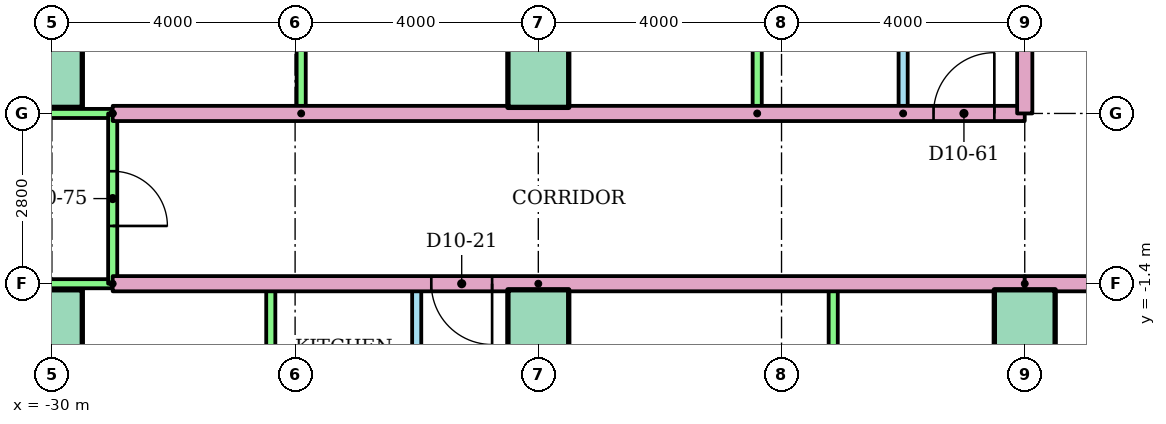
"""IFC4 building model, lengths in metres.
Left out: names, types, materials, properties, quantities, classifications, styles, units other than length and angle.
Written with IfcOpenShell. Run it as: python <this file> out.ifc"""

import sys

from ifc_helpers import new_model, si_unit, direction, frame, frame_2d, origin, origin_2d, place, context, subcontext, project, spatial, rectangle, extrude, element, fill, save


model = new_model("IFC4")
c1 = context("Model", 3, precision=1e-05, world=origin(), true_north=direction((0.0, 1.0)))
c2 = subcontext(c1, "Body", "Model", "MODEL_VIEW")
j1 = project(units=[si_unit("LENGTHUNIT", "METRE"), si_unit("PLANEANGLEUNIT", "RADIAN")], contexts=[c1])
p1 = place(None, origin())
s1 = spatial("IfcSite", under=j1, at=p1, CompositionType="ELEMENT")
p2 = place(p1, origin())
s2 = spatial("IfcBuilding", under=s1, at=p2, CompositionType="ELEMENT")
p3 = place(p2, frame((0.0, 0.0, 41.6)))
s3 = spatial("IfcBuildingStorey", under=s2, at=p3, CompositionType="ELEMENT", Elevation=41.6)
for number, where in (
    (1, (-30.0, -2.0, 0.0)),
    (2, (-22.0, -2.0, 0.0)),
    (3, (-14.0, -2.0, 0.0)),
    (4, (-30.0, 2.0, 0.0)),
    (5, (-22.0, 2.0, 0.0)),
):
    element("IfcColumn", number, at=place(p3, frame(where)), inside=s3, PredefinedType="COLUMN", context=c2, shape_type="SweptSolid", body=[
        extrude(rectangle(XDim=1.0, YDim=1.0, at=origin_2d()), origin(), (0.0, 0.0, 1.0), 3.2),
    ])
p4 = place(p3, frame((-24.0, -7.8, 0.0), z_axis=(0.0, 0.0, 1.0), x_axis=(0.0, 1.0, 0.0)))
e6 = element("IfcWall", 6, at=p4, inside=s3, PredefinedType="PARTITIONING", context=c2, shape_type="SweptSolid", body=[
    extrude(rectangle(XDim=6.4, YDim=0.15, at=frame_2d((3.2, 0.0))), origin(), (0.0, 0.0, 1.0), 2.4),
])
p5 = place(p4, frame((4.14, 0.0, 0.0)))
e7 = element("IfcOpeningElement", 7, at=p5, cuts=e6, PredefinedType="OPENING", context=c2, shape_type="SweptSolid", body=[
    extrude(rectangle(XDim=0.9, YDim=2.1, at=frame_2d((0.45, 1.05))), frame((0.0, 0.085, 0.0), z_axis=(0.0, -1.0, 0.0), x_axis=(1.0, 0.0, 0.0)), (0.0, 0.0, 1.0), 0.17),
])
p6 = place(p4, frame((1.05, 0.0, 0.0)))
e8 = element("IfcOpeningElement", 8, at=p6, cuts=e6, PredefinedType="OPENING", context=c2, shape_type="SweptSolid", body=[
    extrude(rectangle(XDim=0.8, YDim=2.1, at=frame_2d((0.4, 1.05))), frame((0.0, 0.085, 0.0), z_axis=(0.0, -1.0, 0.0), x_axis=(1.0, 0.0, 0.0)), (0.0, 0.0, 1.0), 0.17),
])
for number, where, z_axis, x_axis in (
    (9, (-26.4, -7.8, 0.0), (0.0, 0.0, 1.0), (0.0, 1.0, 0.0)),
    (10, (-17.15, -7.8, 0.0), (0.0, 0.0, 1.0), (0.0, 1.0, 0.0)),
):
    element("IfcWall", number, at=place(p3, frame(where, z_axis=z_axis, x_axis=x_axis)), inside=s3, PredefinedType="PARTITIONING", context=c2, shape_type="SweptSolid", body=[
        extrude(rectangle(XDim=6.4, YDim=0.15, at=frame_2d((3.2, 0.0))), origin(), (0.0, 0.0, 1.0), 2.4),
    ])
p7 = place(p3, frame((-22.0, -1.4, 0.0), z_axis=(0.0, 0.0, 1.0), x_axis=(0.0, -1.0, 0.0)))
e11 = element("IfcWall", 11, at=p7, inside=s3, PredefinedType="PARTITIONING", context=c2, shape_type="SweptSolid", body=[
    extrude(rectangle(XDim=14.71, YDim=0.25, at=frame_2d((7.355, 0.0))), origin(), (0.0, 0.0, 1.0), 2.4),
])
p8 = place(p3, frame((-14.0, -1.4, 0.0), z_axis=(0.0, 0.0, 1.0), x_axis=(-1.0, 0.0, 0.0)))
e12 = element("IfcWall", 12, at=p8, inside=s3, PredefinedType="PARTITIONING", context=c2, shape_type="SweptSolid", body=[
    extrude(rectangle(XDim=15.0, YDim=0.25, at=frame_2d((7.5, 0.0))), origin(), (0.0, 0.0, 1.0), 2.4),
])
p9 = place(p8, frame((8.76, 0.0, 0.0)))
e13 = element("IfcOpeningElement", 13, at=p9, cuts=e12, PredefinedType="OPENING", context=c2, shape_type="SweptSolid", body=[
    extrude(rectangle(XDim=1.0, YDim=2.1, at=frame_2d((0.5, 1.05))), frame((0.0, 0.135, 0.0), z_axis=(0.0, -1.0, 0.0), x_axis=(1.0, 0.0, 0.0)), (0.0, 0.0, 1.0), 0.27),
])
p10 = place(p3, frame((-29.0, -1.4, 0.0), z_axis=(0.0, 0.0, 1.0), x_axis=(-1.0, 0.0, 0.0)))
e14 = element("IfcWall", 14, at=p10, inside=s3, PredefinedType="PARTITIONING", context=c2, shape_type="SweptSolid", body=[
    extrude(rectangle(XDim=7.52, YDim=0.15, at=frame_2d((3.76, 0.0))), origin(), (0.0, 0.0, 1.0), 2.4),
])
p11 = place(p3, frame((-16.0, 1.4, 0.0), z_axis=(0.0, 0.0, 1.0), x_axis=(0.0, 1.0, 0.0)))
e15 = element("IfcWall", 15, at=p11, inside=s3, PredefinedType="PARTITIONING", context=c2, shape_type="SweptSolid", body=[
    extrude(rectangle(XDim=8.8, YDim=0.15, at=frame_2d((4.4, 0.0))), origin(), (0.0, 0.0, 1.0), 2.4),
])
p12 = place(p11, frame((1.925, 0.0, 0.0)))
e16 = element("IfcOpeningElement", 16, at=p12, cuts=e15, PredefinedType="OPENING", context=c2, shape_type="SweptSolid", body=[
    extrude(rectangle(XDim=0.9, YDim=2.1, at=frame_2d((0.45, 1.05))), frame((0.0, 0.085, 0.0), z_axis=(0.0, -1.0, 0.0), x_axis=(1.0, 0.0, 0.0)), (0.0, 0.0, 1.0), 0.17),
])
p13 = place(p11, frame((6.375, 0.0, 0.0)))
e17 = element("IfcOpeningElement", 17, at=p13, cuts=e15, PredefinedType="OPENING", context=c2, shape_type="SweptSolid", body=[
    extrude(rectangle(XDim=0.8, YDim=2.1, at=frame_2d((0.4, 1.05))), frame((0.0, 0.085, 0.0), z_axis=(0.0, -1.0, 0.0), x_axis=(1.0, 0.0, 0.0)), (0.0, 0.0, 1.0), 0.17),
])
for number, where, z_axis, x_axis in (
    (18, (-18.4, 1.4, 0.0), (0.0, 0.0, 1.0), (0.0, 1.0, 0.0)),
    (19, (-25.9, 1.4, 0.0), (0.0, 0.0, 1.0), (0.0, 1.0, 0.0)),
):
    element("IfcWall", number, at=place(p3, frame(where, z_axis=z_axis, x_axis=x_axis)), inside=s3, PredefinedType="PARTITIONING", context=c2, shape_type="SweptSolid", body=[
        extrude(rectangle(XDim=8.8, YDim=0.15, at=frame_2d((4.4, 0.0))), origin(), (0.0, 0.0, 1.0), 2.4),
    ])
p14 = place(p3, frame((-29.0, 1.4, 0.0)))
e20 = element("IfcWall", 20, at=p14, inside=s3, PredefinedType="PARTITIONING", context=c2, shape_type="SweptSolid", body=[
    extrude(rectangle(XDim=15.0, YDim=0.25, at=frame_2d((7.5, 0.0))), origin(), (0.0, 0.0, 1.0), 2.4),
])
p15 = place(p14, frame((13.5, 0.0, 0.0)))
e21 = element("IfcOpeningElement", 21, at=p15, cuts=e20, PredefinedType="OPENING", context=c2, shape_type="SweptSolid", body=[
    extrude(rectangle(XDim=1.0, YDim=2.1, at=frame_2d((0.5, 1.05))), frame((0.0, 0.135, 0.0), z_axis=(0.0, -1.0, 0.0), x_axis=(1.0, 0.0, 0.0)), (0.0, 0.0, 1.0), 0.27),
])
p16 = place(p3, frame((-36.52, 1.4, 0.0)))
e22 = element("IfcWall", 22, at=p16, inside=s3, PredefinedType="PARTITIONING", context=c2, shape_type="SweptSolid", body=[
    extrude(rectangle(XDim=7.52, YDim=0.15, at=frame_2d((3.76, 0.0))), origin(), (0.0, 0.0, 1.0), 2.4),
])
p17 = place(p3, frame((-29.0, 1.4, 0.0), z_axis=(0.0, 0.0, 1.0), x_axis=(0.0, -1.0, 0.0)))
e23 = element("IfcWall", 23, at=p17, inside=s3, PredefinedType="PARTITIONING", context=c2, shape_type="SweptSolid", body=[
    extrude(rectangle(XDim=2.8, YDim=0.15, at=frame_2d((1.4, 0.0))), origin(), (0.0, 0.0, 1.0), 2.4),
])
p18 = place(p17, frame((0.95, 0.0, 0.0)))
e24 = element("IfcOpeningElement", 24, at=p18, cuts=e23, PredefinedType="OPENING", context=c2, shape_type="SweptSolid", body=[
    extrude(rectangle(XDim=0.9, YDim=2.1, at=frame_2d((0.45, 1.05))), frame((0.0, 0.085, 0.0), z_axis=(0.0, -1.0, 0.0), x_axis=(1.0, 0.0, 0.0)), (0.0, 0.0, 1.0), 0.17),
])
p19 = place(p3, frame((14.0, -1.4, 0.0), z_axis=(0.0, 0.0, 1.0), x_axis=(-1.0, 0.0, 0.0)))
e25 = element("IfcWall", 25, at=p19, inside=s3, PredefinedType="PARTITIONING", context=c2, shape_type="SweptSolid", body=[
    extrude(rectangle(XDim=28.0, YDim=0.25, at=frame_2d((14.0, 0.0))), origin(), (0.0, 0.0, 1.0), 2.4),
])
p20 = place(p19, frame((12.76, 0.0, 0.0)))
e26 = element("IfcOpeningElement", 26, at=p20, cuts=e25, PredefinedType="OPENING", context=c2, shape_type="SweptSolid", body=[
    extrude(rectangle(XDim=1.0, YDim=2.1, at=frame_2d((0.5, 1.05))), frame((0.0, 0.135, 0.0), z_axis=(0.0, -1.0, 0.0), x_axis=(1.0, 0.0, 0.0)), (0.0, 0.0, 1.0), 0.27),
])
p21 = place(p19, frame((10.24, 0.0, 0.0)))
e27 = element("IfcOpeningElement", 27, at=p21, cuts=e25, PredefinedType="OPENING", context=c2, shape_type="SweptSolid", body=[
    extrude(rectangle(XDim=1.0, YDim=2.1, at=frame_2d((0.5, 1.05))), frame((0.0, 0.135, 0.0), z_axis=(0.0, -1.0, 0.0), x_axis=(1.0, 0.0, 0.0)), (0.0, 0.0, 1.0), 0.27),
])
p22 = place(p3, frame((-14.0, 3.0, 0.0), z_axis=(0.0, 0.0, 1.0), x_axis=(0.0, -1.0, 0.0)))
e28 = element("IfcWall", 28, at=p22, inside=s3, PredefinedType="PARTITIONING", context=c2, shape_type="SweptSolid", body=[
    extrude(rectangle(XDim=1.6, YDim=0.25, at=frame_2d((0.8, 0.0))), origin(), (0.0, 0.0, 1.0), 2.4),
])
p23 = place(p9, origin())
e29 = element("IfcDoor", 29, at=p23, inside=s3, OperationType="SINGLE_SWING_LEFT", PredefinedType="DOOR", context=c2, shape_type="SweptSolid", body=[
    extrude(rectangle(XDim=1.0, YDim=2.1, at=frame_2d((0.5, 1.05))), frame((0.0, 0.025, 0.0), z_axis=(0.0, -1.0, 0.0), x_axis=(1.0, 0.0, 0.0)), (0.0, 0.0, 1.0), 0.05),
])
fill(e13, e29)
p24 = place(p15, origin())
e30 = element("IfcDoor", 30, at=p24, inside=s3, OperationType="SINGLE_SWING_RIGHT", PredefinedType="DOOR", context=c2, shape_type="SweptSolid", body=[
    extrude(rectangle(XDim=1.0, YDim=2.1, at=frame_2d((0.5, 1.05))), frame((0.0, 0.025, 0.0), z_axis=(0.0, -1.0, 0.0), x_axis=(1.0, 0.0, 0.0)), (0.0, 0.0, 1.0), 0.05),
])
fill(e21, e30)
p25 = place(p18, origin())
e31 = element("IfcDoor", 31, at=p25, inside=s3, OperationType="SINGLE_SWING_RIGHT", PredefinedType="DOOR", context=c2, shape_type="SweptSolid", body=[
    extrude(rectangle(XDim=0.9, YDim=2.1, at=frame_2d((0.45, 1.05))), frame((0.0, 0.025, 0.0), z_axis=(0.0, -1.0, 0.0), x_axis=(1.0, 0.0, 0.0)), (0.0, 0.0, 1.0), 0.05),
])
fill(e24, e31)
save(model, sys.argv[1])
